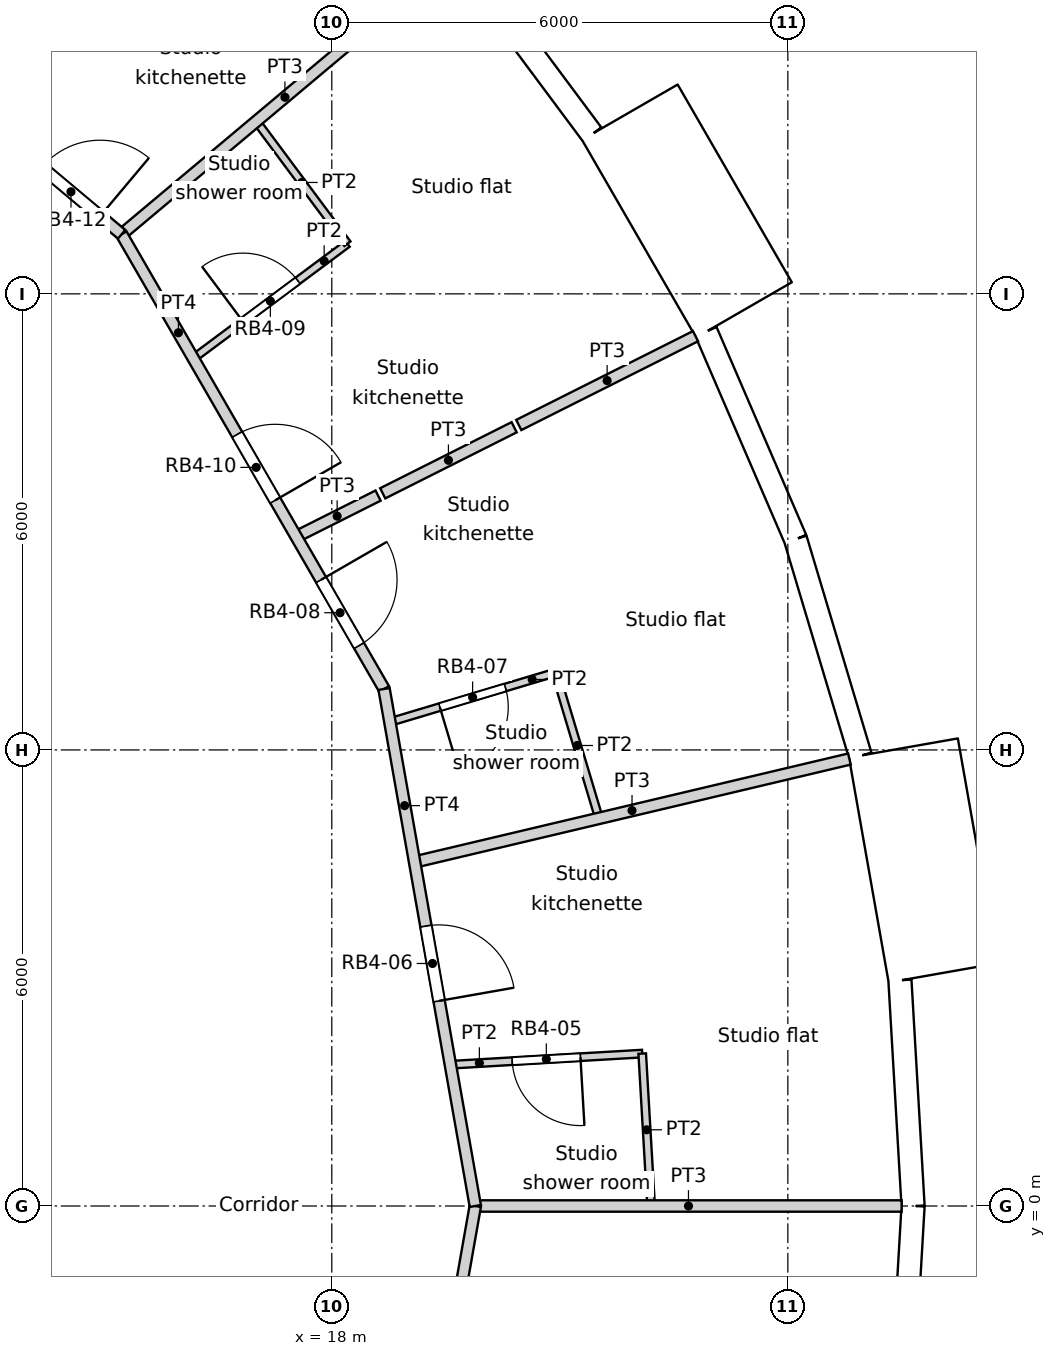
"""IFC4 building model, lengths in metres.
Left out: names, types, materials, properties, quantities, classifications, styles, units other than length and angle.
Written with IfcOpenShell. Run it as: python <this file> out.ifc"""

import sys

from ifc_helpers import new_model, si_unit, direction, frame, frame_2d, origin, origin_2d, place, context, subcontext, project, spatial, rectangle, circle, extrude, element, fill, save


model = new_model("IFC4")
c1 = context("Model", 3, precision=1e-05, world=origin(), true_north=direction((0.0, 1.0)))
c2 = subcontext(c1, "Body", "Model", "MODEL_VIEW")
j1 = project(units=[si_unit("LENGTHUNIT", "METRE"), si_unit("PLANEANGLEUNIT", "RADIAN")], contexts=[c1])
p1 = place(None, origin())
s1 = spatial("IfcSite", under=j1, at=p1, CompositionType="ELEMENT")
p2 = place(p1, origin())
s2 = spatial("IfcBuilding", under=s1, at=p2, CompositionType="ELEMENT")
p3 = place(p2, frame((0.0, 0.0, 158.4)))
s3 = spatial("IfcBuildingStorey", under=s2, at=p3, CompositionType="ELEMENT", Elevation=158.4)
for number, where, z_axis, x_axis in (
    (1, (24.548, 0.0, 0.0), (0.0, 0.0, 1.0), (1.0, 0.0, 0.0)),
    (2, (23.886, 5.661, 0.0), (0.0, 0.0, 1.0), (1.0, 0.0, 0.0)),
    (3, (21.937, 11.017, 0.0), (0.0, 0.0, 1.0), (1.0, 0.0, 0.0)),
):
    element("IfcColumn", number, at=place(p3, frame(where, z_axis=z_axis, x_axis=x_axis)), inside=s3, PredefinedType="COLUMN", context=c2, shape_type="SweptSolid", body=[
        extrude(circle(Radius=0.6, at=origin_2d()), origin(), (0.0, 0.0, 1.0), 3.6),
    ])
for number, where, z_axis, x_axis in (
    (4, (18.822, 0.0, 0.0), (0.0, 0.0, 1.0), (1.0, 0.0, 0.0)),
    (5, (17.986, 5.548, 0.0), (0.0, 0.0, 1.0), (1.0, 0.0, 0.0)),
    (6, (15.552, 10.603, 0.0), (0.0, 0.0, 1.0), (1.0, 0.0, 0.0)),
):
    element("IfcColumn", number, at=place(p3, frame(where, z_axis=z_axis, x_axis=x_axis)), inside=s3, PredefinedType="COLUMN", context=c2, shape_type="SweptSolid", body=[
        extrude(circle(Radius=0.65, at=origin_2d()), origin(), (0.0, 0.0, 1.0), 3.6),
    ])
p4 = place(p3, frame((25.647, 0.0, 0.0), z_axis=(0.0, 0.0, 1.0), x_axis=(-0.058144307138, 0.998308188661, 0.0)))
e7 = element("IfcWall", 7, at=p4, inside=s3, PredefinedType="SOLIDWALL", context=c2, shape_type="SweptSolid", body=[
    extrude(rectangle(XDim=2.973, YDim=0.3, at=frame_2d((1.486, 0.0))), origin(), (0.0, 0.0, 1.0), 3.3),
])
p5 = place(p4, frame((1.486, 0.0, 1.55)))
e8 = element("IfcOpeningElement", 8, at=p5, cuts=e7, PredefinedType="OPENING", context=c2, shape_type="SweptSolid", body=[
    extrude(circle(Radius=0.9, at=origin_2d()), frame((0.0, 0.16, 0.0), z_axis=(0.0, -1.0, 0.0), x_axis=(1.0, 0.0, 0.0)), (0.0, 0.0, 1.0), 0.32),
])
p6 = place(p3, frame((26.042, 3.069, -0.3), z_axis=(0.0, 0.0, 1.0), x_axis=(-0.173669267716, 0.984804034035, 0.0)))
e9 = element("IfcWall", 9, at=p6, inside=s3, PredefinedType="ELEMENTEDWALL", context=c2, shape_type="SweptSolid", body=[
    extrude(rectangle(XDim=3.0, YDim=1.45, at=frame_2d((1.5, 0.0))), origin(), (0.0, 0.0, 1.0), 3.6),
])
p7 = place(p6, frame((1.5, 0.0, 1.85)))
e10 = element("IfcOpeningElement", 10, at=p7, cuts=e9, PredefinedType="OPENING", context=c2, shape_type="SweptSolid", body=[
    extrude(circle(Radius=0.9, at=origin_2d()), frame((0.0, 0.735, 0.0), z_axis=(0.0, -1.0, 0.0), x_axis=(1.0, 0.0, 0.0)), (0.0, 0.0, 1.0), 1.47),
])
p8 = place(p3, frame((24.953, 5.924, 0.0), z_axis=(0.0, 0.0, 1.0), x_axis=(-0.286782750849, 0.957995643944, 0.0)))
e11 = element("IfcWall", 11, at=p8, inside=s3, PredefinedType="SOLIDWALL", context=c2, shape_type="SweptSolid", body=[
    extrude(rectangle(XDim=2.973, YDim=0.3, at=frame_2d((1.486, 0.0))), origin(), (0.0, 0.0, 1.0), 3.3),
])
p9 = place(p8, frame((1.486, 0.0, 1.55)))
e12 = element("IfcOpeningElement", 12, at=p9, cuts=e11, PredefinedType="OPENING", context=c2, shape_type="SweptSolid", body=[
    extrude(circle(Radius=0.9, at=origin_2d()), frame((0.0, 0.16, 0.0), z_axis=(0.0, -1.0, 0.0), x_axis=(1.0, 0.0, 0.0)), (0.0, 0.0, 1.0), 0.32),
])
p10 = place(p3, frame((24.101, 8.772, 0.0), z_axis=(0.0, 0.0, 1.0), x_axis=(-0.396148129016, 0.918186614952, 0.0)))
e13 = element("IfcWall", 13, at=p10, inside=s3, PredefinedType="SOLIDWALL", context=c2, shape_type="SweptSolid", body=[
    extrude(rectangle(XDim=2.973, YDim=0.3, at=frame_2d((1.486, 0.0))), origin(), (0.0, 0.0, 1.0), 3.3),
])
p11 = place(p10, frame((1.486, 0.0, 1.55)))
e14 = element("IfcOpeningElement", 14, at=p11, cuts=e13, PredefinedType="OPENING", context=c2, shape_type="SweptSolid", body=[
    extrude(circle(Radius=0.9, at=origin_2d()), frame((0.0, 0.16, 0.0), z_axis=(0.0, -1.0, 0.0), x_axis=(1.0, 0.0, 0.0)), (0.0, 0.0, 1.0), 0.32),
])
p12 = place(p3, frame((23.422, 11.791, -0.3), z_axis=(0.0, 0.0, 1.0), x_axis=(-0.499990139034, 0.866031096941, 0.0)))
e15 = element("IfcWall", 15, at=p12, inside=s3, PredefinedType="ELEMENTEDWALL", context=c2, shape_type="SweptSolid", body=[
    extrude(rectangle(XDim=3.0, YDim=1.45, at=frame_2d((1.5, 0.0))), origin(), (0.0, 0.0, 1.0), 3.6),
])
p13 = place(p12, frame((1.5, 0.0, 1.85)))
e16 = element("IfcOpeningElement", 16, at=p13, cuts=e15, PredefinedType="OPENING", context=c2, shape_type="SweptSolid", body=[
    extrude(circle(Radius=0.9, at=origin_2d()), frame((0.0, 0.735, 0.0), z_axis=(0.0, -1.0, 0.0), x_axis=(1.0, 0.0, 0.0)), (0.0, 0.0, 1.0), 1.47),
])
p14 = place(p3, frame((21.422, 14.101, 0.0), z_axis=(0.0, 0.0, 1.0), x_axis=(-0.597197580538, 0.80209416517, 0.0)))
e17 = element("IfcWall", 17, at=p14, inside=s3, PredefinedType="SOLIDWALL", context=c2, shape_type="SweptSolid", body=[
    extrude(rectangle(XDim=2.973, YDim=0.3, at=frame_2d((1.486, 0.0))), origin(), (0.0, 0.0, 1.0), 3.3),
])
p15 = place(p14, frame((1.486, 0.0, 1.55)))
e18 = element("IfcOpeningElement", 18, at=p15, cuts=e17, PredefinedType="OPENING", context=c2, shape_type="SweptSolid", body=[
    extrude(circle(Radius=0.9, at=origin_2d()), frame((0.0, 0.16, 0.0), z_axis=(0.0, -1.0, 0.0), x_axis=(1.0, 0.0, 0.0)), (0.0, 0.0, 1.0), 0.32),
])
p16 = place(p3, frame((25.475, -2.968, 0.0), z_axis=(0.0, 0.0, 1.0), x_axis=(0.058144307138, 0.998308188661, 0.0)))
e19 = element("IfcWall", 19, at=p16, inside=s3, PredefinedType="SOLIDWALL", context=c2, shape_type="SweptSolid", body=[
    extrude(rectangle(XDim=2.973, YDim=0.3, at=frame_2d((1.486, 0.0))), origin(), (0.0, 0.0, 1.0), 3.3),
])
p17 = place(p16, frame((1.486, 0.0, 1.55)))
e20 = element("IfcOpeningElement", 20, at=p17, cuts=e19, PredefinedType="OPENING", context=c2, shape_type="SweptSolid", body=[
    extrude(circle(Radius=0.9, at=origin_2d()), frame((0.0, 0.16, 0.0), z_axis=(0.0, -1.0, 0.0), x_axis=(1.0, 0.0, 0.0)), (0.0, 0.0, 1.0), 0.32),
])
p18 = place(p3, frame((18.688, 6.802, 0.0), z_axis=(0.0, 0.0, 1.0), x_axis=(0.173831710537, -0.984775373581, 0.0)))
e21 = element("IfcWall", 21, at=p18, inside=s3, PredefinedType="PARTITIONING", context=c2, shape_type="SweptSolid", body=[
    extrude(rectangle(XDim=6.907, YDim=0.15, at=frame_2d((3.454, 0.0))), origin(), (0.0, 0.0, 1.0), 3.3),
])
p19 = place(p18, frame((3.167, 0.0, 0.0)))
e22 = element("IfcOpeningElement", 22, at=p19, cuts=e21, PredefinedType="OPENING", context=c2, shape_type="SweptSolid", body=[
    extrude(rectangle(XDim=1.0, YDim=2.1, at=frame_2d((0.5, 1.05))), frame((0.0, 0.075, 0.0), z_axis=(0.0, -1.0, 0.0), x_axis=(1.0, 0.0, 0.0)), (0.0, 0.0, 1.0), 0.15),
])
p20 = place(p3, frame((15.235, 12.784, 0.0), z_axis=(0.0, 0.0, 1.0), x_axis=(0.499940714931, -0.86605962933, 0.0)))
e23 = element("IfcWall", 23, at=p20, inside=s3, PredefinedType="PARTITIONING", context=c2, shape_type="SweptSolid", body=[
    extrude(rectangle(XDim=6.907, YDim=0.15, at=frame_2d((3.454, 0.0))), origin(), (0.0, 0.0, 1.0), 3.3),
])
p21 = place(p20, frame((5.249, 0.0, 0.0)))
e24 = element("IfcOpeningElement", 24, at=p21, cuts=e23, PredefinedType="OPENING", context=c2, shape_type="SweptSolid", body=[
    extrude(rectangle(XDim=1.0, YDim=2.1, at=frame_2d((0.5, 1.05))), frame((0.0, 0.075, 0.0), z_axis=(0.0, -1.0, 0.0), x_axis=(1.0, 0.0, 0.0)), (0.0, 0.0, 1.0), 0.15),
])
p22 = place(p20, frame((3.041, 0.0, 0.0)))
e25 = element("IfcOpeningElement", 25, at=p22, cuts=e23, PredefinedType="OPENING", context=c2, shape_type="SweptSolid", body=[
    extrude(rectangle(XDim=1.0, YDim=2.1, at=frame_2d((0.5, 1.05))), frame((0.0, 0.075, 0.0), z_axis=(0.0, -1.0, 0.0), x_axis=(1.0, 0.0, 0.0)), (0.0, 0.0, 1.0), 0.15),
])
p23 = place(p3, frame((9.943, 17.222, 0.0), z_axis=(0.0, 0.0, 1.0), x_axis=(0.766192104565, -0.642611592567, 0.0)))
e26 = element("IfcWall", 26, at=p23, inside=s3, PredefinedType="PARTITIONING", context=c2, shape_type="SweptSolid", body=[
    extrude(rectangle(XDim=6.906, YDim=0.15, at=frame_2d((3.453, 0.0))), origin(), (0.0, 0.0, 1.0), 3.3),
])
p24 = place(p23, frame((5.537, 0.0, 0.0)))
e27 = element("IfcOpeningElement", 27, at=p24, cuts=e26, PredefinedType="OPENING", context=c2, shape_type="SweptSolid", body=[
    extrude(rectangle(XDim=1.0, YDim=2.1, at=frame_2d((0.5, 1.05))), frame((0.0, 0.075, 0.0), z_axis=(0.0, -1.0, 0.0), x_axis=(1.0, 0.0, 0.0)), (0.0, 0.0, 1.0), 0.15),
])
p25 = place(p3, frame((18.688, -6.802, 0.0), z_axis=(0.0, 0.0, 1.0), x_axis=(0.173728873845, 0.98479352069, 0.0)))
e28 = element("IfcWall", 28, at=p25, inside=s3, PredefinedType="PARTITIONING", context=c2, shape_type="SweptSolid", body=[
    extrude(rectangle(XDim=6.907, YDim=0.15, at=frame_2d((3.454, 0.0))), origin(), (0.0, 0.0, 1.0), 3.3),
])
p26 = place(p25, frame((2.953, 0.0, 0.0)))
e29 = element("IfcOpeningElement", 29, at=p26, cuts=e28, PredefinedType="OPENING", context=c2, shape_type="SweptSolid", body=[
    extrude(rectangle(XDim=1.0, YDim=2.04, at=frame_2d((0.5, 1.02))), frame((0.0, 0.075, 0.0), z_axis=(0.0, -1.0, 0.0), x_axis=(1.0, 0.0, 0.0)), (0.0, 0.0, 1.0), 0.15),
])
p27 = place(p3, frame((22.084, 2.005, 0.0), z_axis=(0.0, 0.0, 1.0), x_axis=(0.058230299749, -0.998303176491, 0.0)))
e30 = element("IfcWall", 30, at=p27, inside=s3, PredefinedType="PARTITIONING", context=c2, shape_type="SweptSolid", body=[
    extrude(rectangle(XDim=2.008, YDim=0.1, at=frame_2d((1.004, 0.0))), origin(), (0.0, 0.0, 1.0), 3.3),
])
p28 = place(p3, frame((19.56, 1.858, 0.0), z_axis=(0.0, 0.0, 1.0), x_axis=(0.998308830473, 0.05813328651, 0.0)))
e31 = element("IfcWall", 31, at=p28, inside=s3, PredefinedType="PARTITIONING", context=c2, shape_type="SweptSolid", body=[
    extrude(rectangle(XDim=2.528, YDim=0.1, at=frame_2d((1.264, 0.0))), origin(), (0.0, 0.0, 1.0), 3.3),
])
p29 = place(p28, frame((0.814, 0.0, 0.0)))
e32 = element("IfcOpeningElement", 32, at=p29, cuts=e31, PredefinedType="OPENING", context=c2, shape_type="SweptSolid", body=[
    extrude(rectangle(XDim=0.9, YDim=2.04, at=frame_2d((0.45, 1.02))), frame((0.0, 0.05, 0.0), z_axis=(0.0, -1.0, 0.0), x_axis=(1.0, 0.0, 0.0)), (0.0, 0.0, 1.0), 0.1),
])
p30 = place(p3, frame((19.09, 4.525, 0.0), z_axis=(0.0, 0.0, 1.0), x_axis=(0.973093766115, 0.230409466707, 0.0)))
e33 = element("IfcWall", 33, at=p30, inside=s3, PredefinedType="PARTITIONING", context=c2, shape_type="SweptSolid", body=[
    extrude(rectangle(XDim=5.879, YDim=0.15, at=frame_2d((2.939, 0.0))), origin(), (0.0, 0.0, 1.0), 3.3),
])
p31 = place(p3, frame((19.888, 0.0, 0.0), z_axis=(0.0, 0.0, 1.0), x_axis=(1.0, 0.0, 0.0)))
e34 = element("IfcWall", 34, at=p31, inside=s3, PredefinedType="PARTITIONING", context=c2, shape_type="SweptSolid", body=[
    extrude(rectangle(XDim=5.609, YDim=0.15, at=frame_2d((2.805, 0.0))), origin(), (0.0, 0.0, 1.0), 3.3),
])
p32 = place(p3, frame((20.941, 7.018, 0.0), z_axis=(0.0, 0.0, 1.0), x_axis=(0.287124264191, -0.957893343182, 0.0)))
e35 = element("IfcWall", 35, at=p32, inside=s3, PredefinedType="PARTITIONING", context=c2, shape_type="SweptSolid", body=[
    extrude(rectangle(XDim=2.003, YDim=0.1, at=frame_2d((1.002, 0.0))), origin(), (0.0, 0.0, 1.0), 3.3),
])
p33 = place(p3, frame((18.765, 6.367, 0.0), z_axis=(0.0, 0.0, 1.0), x_axis=(0.958030169919, 0.286667391807, 0.0)))
e36 = element("IfcWall", 36, at=p33, inside=s3, PredefinedType="PARTITIONING", context=c2, shape_type="SweptSolid", body=[
    extrude(rectangle(XDim=2.271, YDim=0.1, at=frame_2d((1.136, 0.0))), origin(), (0.0, 0.0, 1.0), 3.3),
])
p34 = place(p33, frame((0.685, 0.0, 0.0)))
e37 = element("IfcOpeningElement", 37, at=p34, cuts=e36, PredefinedType="OPENING", context=c2, shape_type="SweptSolid", body=[
    extrude(rectangle(XDim=0.9, YDim=2.04, at=frame_2d((0.45, 1.02))), frame((0.0, 0.05, 0.0), z_axis=(0.0, -1.0, 0.0), x_axis=(1.0, 0.0, 0.0)), (0.0, 0.0, 1.0), 0.1),
])
p35 = place(p3, frame((17.532, 8.805, 0.0), z_axis=(0.0, 0.0, 1.0), x_axis=(0.893574741649, 0.448914447403, 0.0)))
e38 = element("IfcWall", 38, at=p35, inside=s3, PredefinedType="PARTITIONING", context=c2, shape_type="SweptSolid", body=[
    extrude(rectangle(XDim=1.205, YDim=0.15, at=frame_2d((0.603, 0.0))), origin(), (0.0, 0.0, 1.0), 3.3),
])
p36 = place(p3, frame((20.46, 10.275, 0.0), z_axis=(0.0, 0.0, 1.0), x_axis=(0.893543449143, 0.448976730458, 0.0)))
e39 = element("IfcWall", 39, at=p36, inside=s3, PredefinedType="PARTITIONING", context=c2, shape_type="SweptSolid", body=[
    extrude(rectangle(XDim=2.602, YDim=0.15, at=frame_2d((1.301, 0.0))), origin(), (0.0, 0.0, 1.0), 3.3),
])
p37 = place(p3, frame((18.67, 9.376, 0.0), z_axis=(0.0, 0.0, 1.0), x_axis=(0.893466318026, 0.449130202227, 0.0)))
e40 = element("IfcWall", 40, at=p37, inside=s3, PredefinedType="PARTITIONING", context=c2, shape_type="SweptSolid", body=[
    extrude(rectangle(XDim=1.935, YDim=0.15, at=frame_2d((0.968, 0.0))), origin(), (0.0, 0.0, 1.0), 3.3),
])
p38 = place(p3, frame((16.178, 11.15, 0.0), z_axis=(0.0, 0.0, 1.0), x_axis=(0.8020923136, 0.597200067367, 0.0)))
e41 = element("IfcWall", 41, at=p38, inside=s3, PredefinedType="PARTITIONING", context=c2, shape_type="SweptSolid", body=[
    extrude(rectangle(XDim=2.529, YDim=0.1, at=frame_2d((1.264, 0.0))), origin(), (0.0, 0.0, 1.0), 3.3),
])
p39 = place(p38, frame((0.814, 0.0, 0.0)))
e42 = element("IfcOpeningElement", 42, at=p39, cuts=e41, PredefinedType="OPENING", context=c2, shape_type="SweptSolid", body=[
    extrude(rectangle(XDim=0.9, YDim=2.04, at=frame_2d((0.45, 1.02))), frame((0.0, 0.05, 0.0), z_axis=(0.0, -1.0, 0.0), x_axis=(1.0, 0.0, 0.0)), (0.0, 0.0, 1.0), 0.1),
])
p40 = place(p3, frame((17.007, 14.271, 0.0), z_axis=(0.0, 0.0, 1.0), x_axis=(0.597019866774, -0.802226450996, 0.0)))
e43 = element("IfcWall", 43, at=p40, inside=s3, PredefinedType="PARTITIONING", context=c2, shape_type="SweptSolid", body=[
    extrude(rectangle(XDim=2.008, YDim=0.1, at=frame_2d((1.004, 0.0))), origin(), (0.0, 0.0, 1.0), 3.3),
])
p41 = place(p3, frame((15.235, 12.784, 0.0), z_axis=(0.0, 0.0, 1.0), x_axis=(0.766069165353, 0.642758145725, 0.0)))
e44 = element("IfcWall", 44, at=p41, inside=s3, PredefinedType="PARTITIONING", context=c2, shape_type="SweptSolid", body=[
    extrude(rectangle(XDim=5.609, YDim=0.15, at=frame_2d((2.804, 0.0))), origin(), (0.0, 0.0, 1.0), 3.3),
])
p42 = place(p3, frame((13.139, 14.542, 0.0), z_axis=(0.0, 0.0, 1.0), x_axis=(0.642731657745, 0.766091388891, 0.0)))
e45 = element("IfcWall", 45, at=p42, inside=s3, PredefinedType="PARTITIONING", context=c2, shape_type="SweptSolid", body=[
    extrude(rectangle(XDim=2.401, YDim=0.1, at=frame_2d((1.2, 0.0))), origin(), (0.0, 0.0, 1.0), 3.3),
])
p43 = place(p42, frame((0.75, 0.0, 0.0)))
e46 = element("IfcOpeningElement", 46, at=p43, cuts=e45, PredefinedType="OPENING", context=c2, shape_type="SweptSolid", body=[
    extrude(rectangle(XDim=0.9, YDim=2.04, at=frame_2d((0.45, 1.02))), frame((0.0, 0.05, 0.0), z_axis=(0.0, -1.0, 0.0), x_axis=(1.0, 0.0, 0.0)), (0.0, 0.0, 1.0), 0.1),
])
p44 = place(p5, origin())
e47 = element("IfcWindow", 47, at=p44, inside=s3, PartitioningType="SINGLE_PANEL", PredefinedType="WINDOW", context=c2, shape_type="SweptSolid", body=[
    extrude(circle(Radius=0.9, at=origin_2d()), frame((0.0, 0.12, 0.0), z_axis=(0.0, -1.0, 0.0), x_axis=(1.0, 0.0, 0.0)), (0.0, 0.0, 1.0), 0.1),
])
fill(e8, e47)
p45 = place(p7, origin())
e48 = element("IfcWindow", 48, at=p45, inside=s3, PartitioningType="SINGLE_PANEL", PredefinedType="WINDOW", context=c2, shape_type="SweptSolid", body=[
    extrude(circle(Radius=0.9, at=origin_2d()), frame((0.0, 0.695, 0.0), z_axis=(0.0, -1.0, 0.0), x_axis=(1.0, 0.0, 0.0)), (0.0, 0.0, 1.0), 0.1),
])
fill(e10, e48)
p46 = place(p9, origin())
e49 = element("IfcWindow", 49, at=p46, inside=s3, PartitioningType="SINGLE_PANEL", PredefinedType="WINDOW", context=c2, shape_type="SweptSolid", body=[
    extrude(circle(Radius=0.9, at=origin_2d()), frame((0.0, 0.12, 0.0), z_axis=(0.0, -1.0, 0.0), x_axis=(1.0, 0.0, 0.0)), (0.0, 0.0, 1.0), 0.1),
])
fill(e12, e49)
p47 = place(p11, origin())
e50 = element("IfcWindow", 50, at=p47, inside=s3, PartitioningType="SINGLE_PANEL", PredefinedType="WINDOW", context=c2, shape_type="SweptSolid", body=[
    extrude(circle(Radius=0.9, at=origin_2d()), frame((0.0, 0.12, 0.0), z_axis=(0.0, -1.0, 0.0), x_axis=(1.0, 0.0, 0.0)), (0.0, 0.0, 1.0), 0.1),
])
fill(e14, e50)
p48 = place(p13, origin())
e51 = element("IfcWindow", 51, at=p48, inside=s3, PartitioningType="SINGLE_PANEL", PredefinedType="WINDOW", context=c2, shape_type="SweptSolid", body=[
    extrude(circle(Radius=0.9, at=origin_2d()), frame((0.0, 0.695, 0.0), z_axis=(0.0, -1.0, 0.0), x_axis=(1.0, 0.0, 0.0)), (0.0, 0.0, 1.0), 0.1),
])
fill(e16, e51)
p49 = place(p15, origin())
e52 = element("IfcWindow", 52, at=p49, inside=s3, PartitioningType="SINGLE_PANEL", PredefinedType="WINDOW", context=c2, shape_type="SweptSolid", body=[
    extrude(circle(Radius=0.9, at=origin_2d()), frame((0.0, 0.12, 0.0), z_axis=(0.0, -1.0, 0.0), x_axis=(1.0, 0.0, 0.0)), (0.0, 0.0, 1.0), 0.1),
])
fill(e18, e52)
p50 = place(p17, origin())
e53 = element("IfcWindow", 53, at=p50, inside=s3, PartitioningType="SINGLE_PANEL", PredefinedType="WINDOW", context=c2, shape_type="SweptSolid", body=[
    extrude(circle(Radius=0.9, at=origin_2d()), frame((0.0, 0.12, 0.0), z_axis=(0.0, -1.0, 0.0), x_axis=(1.0, 0.0, 0.0)), (0.0, 0.0, 1.0), 0.1),
])
fill(e20, e53)
p51 = place(p29, origin())
e54 = element("IfcDoor", 54, at=p51, inside=s3, OperationType="SINGLE_SWING_LEFT", PredefinedType="DOOR", context=c2, shape_type="SweptSolid", body=[
    extrude(rectangle(XDim=0.9, YDim=2.04, at=frame_2d((0.45, 1.02))), frame((0.0, 0.025, 0.0), z_axis=(0.0, -1.0, 0.0), x_axis=(1.0, 0.0, 0.0)), (0.0, 0.0, 1.0), 0.05),
])
fill(e32, e54)
p52 = place(p19, origin())
e55 = element("IfcDoor", 55, at=p52, inside=s3, OperationType="SINGLE_SWING_RIGHT", PredefinedType="DOOR", context=c2, shape_type="SweptSolid", body=[
    extrude(rectangle(XDim=1.0, YDim=2.1, at=frame_2d((0.5, 1.05))), frame((0.0, 0.025, 0.0), z_axis=(0.0, -1.0, 0.0), x_axis=(1.0, 0.0, 0.0)), (0.0, 0.0, 1.0), 0.05),
])
fill(e22, e55)
p53 = place(p34, origin())
e56 = element("IfcDoor", 56, at=p53, inside=s3, OperationType="SINGLE_SWING_RIGHT", PredefinedType="DOOR", context=c2, shape_type="SweptSolid", body=[
    extrude(rectangle(XDim=0.9, YDim=2.04, at=frame_2d((0.45, 1.02))), frame((0.0, 0.025, 0.0), z_axis=(0.0, -1.0, 0.0), x_axis=(1.0, 0.0, 0.0)), (0.0, 0.0, 1.0), 0.05),
])
fill(e37, e56)
p54 = place(p21, origin())
e57 = element("IfcDoor", 57, at=p54, inside=s3, OperationType="SINGLE_SWING_LEFT", PredefinedType="DOOR", context=c2, shape_type="SweptSolid", body=[
    extrude(rectangle(XDim=1.0, YDim=2.1, at=frame_2d((0.5, 1.05))), frame((0.0, 0.025, 0.0), z_axis=(0.0, -1.0, 0.0), x_axis=(1.0, 0.0, 0.0)), (0.0, 0.0, 1.0), 0.05),
])
fill(e24, e57)
p55 = place(p39, origin())
e58 = element("IfcDoor", 58, at=p55, inside=s3, OperationType="SINGLE_SWING_LEFT", PredefinedType="DOOR", context=c2, shape_type="SweptSolid", body=[
    extrude(rectangle(XDim=0.9, YDim=2.04, at=frame_2d((0.45, 1.02))), frame((0.0, 0.025, 0.0), z_axis=(0.0, -1.0, 0.0), x_axis=(1.0, 0.0, 0.0)), (0.0, 0.0, 1.0), 0.05),
])
fill(e42, e58)
p56 = place(p22, origin())
e59 = element("IfcDoor", 59, at=p56, inside=s3, OperationType="SINGLE_SWING_RIGHT", PredefinedType="DOOR", context=c2, shape_type="SweptSolid", body=[
    extrude(rectangle(XDim=1.0, YDim=2.1, at=frame_2d((0.5, 1.05))), frame((0.0, 0.025, 0.0), z_axis=(0.0, -1.0, 0.0), x_axis=(1.0, 0.0, 0.0)), (0.0, 0.0, 1.0), 0.05),
])
fill(e25, e59)
p57 = place(p24, origin())
e60 = element("IfcDoor", 60, at=p57, inside=s3, OperationType="SINGLE_SWING_RIGHT", PredefinedType="DOOR", context=c2, shape_type="SweptSolid", body=[
    extrude(rectangle(XDim=1.0, YDim=2.1, at=frame_2d((0.5, 1.05))), frame((0.0, 0.025, 0.0), z_axis=(0.0, -1.0, 0.0), x_axis=(1.0, 0.0, 0.0)), (0.0, 0.0, 1.0), 0.05),
])
fill(e27, e60)
save(model, sys.argv[1])
